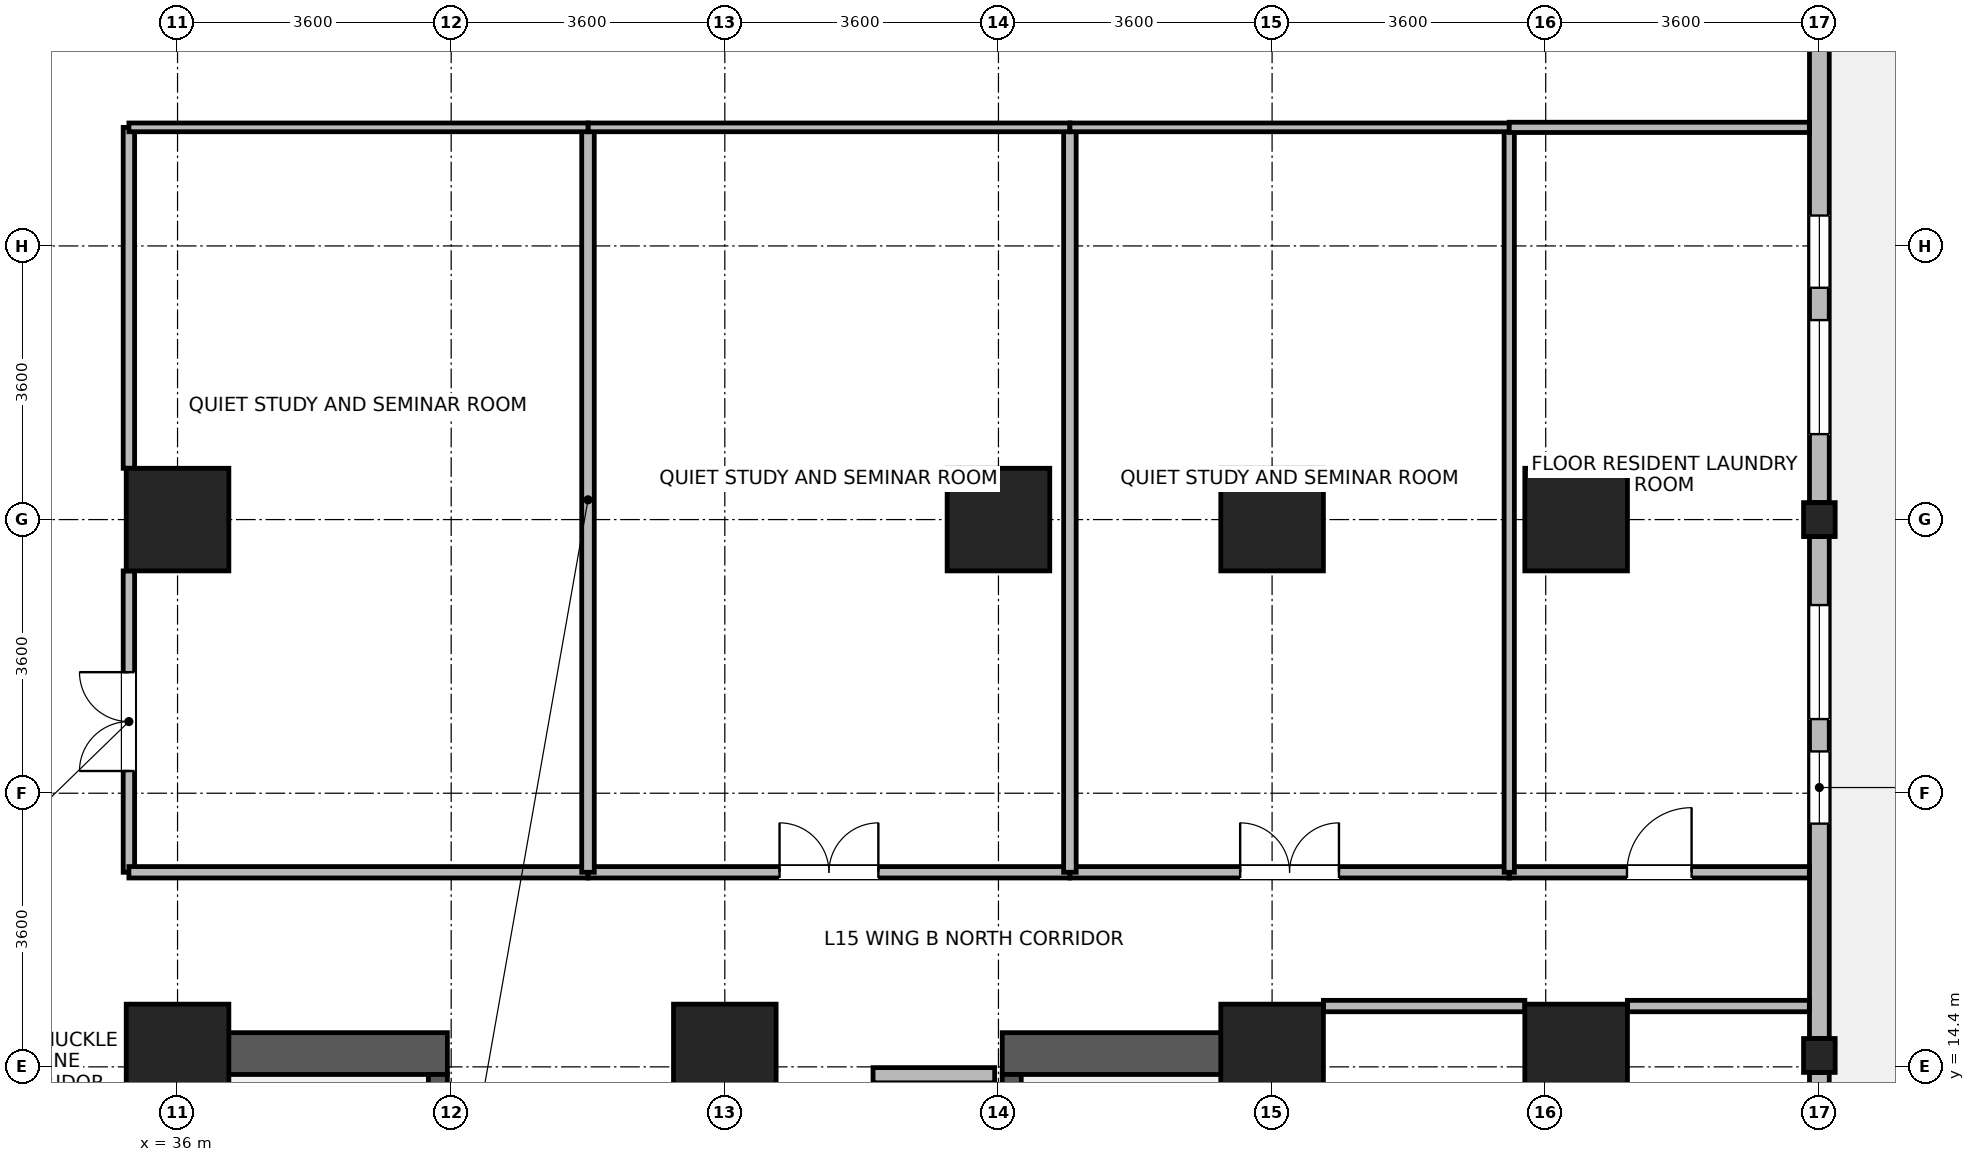
"""IFC4 building model, lengths in metres.
Left out: names, types, materials, properties, quantities, classifications, styles, units other than length and angle.
Written with IfcOpenShell. Run it as: python <this file> out.ifc"""

import sys

from ifc_helpers import new_model, si_unit, direction, frame, frame_2d, origin, origin_2d, place, context, subcontext, project, spatial, rectangle, i_section, extrude, source, transform, mapped, element, fill, save


model = new_model("IFC4")
c1 = context("Model", 3, precision=1e-05, world=origin(), true_north=direction((0.0, 1.0)))
c2 = subcontext(c1, "Body", "Model", "MODEL_VIEW")
j1 = project(units=[si_unit("LENGTHUNIT", "METRE"), si_unit("PLANEANGLEUNIT", "RADIAN")], contexts=[c1])
p1 = place(None, origin())
s1 = spatial("IfcSite", under=j1, at=p1, CompositionType="ELEMENT")
p2 = place(p1, origin())
s2 = spatial("IfcBuilding", under=s1, at=p2, CompositionType="ELEMENT")
p3 = place(p2, frame((0.0, 0.0, 62.3)))
s3 = spatial("IfcBuildingStorey", under=s2, at=p3, CompositionType="ELEMENT", Elevation=62.3)
for number, where, z_axis, x_axis in (
    (1, (36.075, 6.75, 0.0), (0.0, 0.0, 1.0), (0.0, 1.0, 0.0)),
    (2, (50.325, 6.75, 0.0), (0.0, 0.0, 1.0), (0.0, 1.0, 0.0)),
):
    element("IfcWall", number, at=place(p3, frame(where, z_axis=z_axis, x_axis=x_axis)), inside=s3, PredefinedType="SHEAR", context=c2, shape_type="SweptSolid", body=[
        extrude(rectangle(XDim=8.1, YDim=0.55, at=frame_2d((4.05, 0.0))), origin(), (0.0, 0.0, 1.0), 3.45),
    ])
for number, where, z_axis, x_axis in (
    (3, (36.35, 14.575, 0.0), (0.0, 0.0, 1.0), (1.0, 0.0, 0.0)),
    (4, (46.85, 14.575, 0.0), (0.0, 0.0, 1.0), (1.0, 0.0, 0.0)),
):
    element("IfcWall", number, at=place(p3, frame(where, z_axis=z_axis, x_axis=x_axis)), inside=s3, PredefinedType="SHEAR", context=c2, shape_type="SweptSolid", body=[
        extrude(rectangle(XDim=3.2, YDim=0.55, at=frame_2d((1.6, 0.0))), origin(), (0.0, 0.0, 1.0), 3.45),
    ])
p4 = place(p3, frame((39.425, 7.3, 0.0), z_axis=(0.0, 0.0, 1.0), x_axis=(0.0, 1.0, 0.0)))
e5 = element("IfcWall", 5, at=p4, inside=s3, PredefinedType="SHEAR", context=c2, shape_type="SweptSolid", body=[
    extrude(rectangle(XDim=7.0, YDim=0.25, at=frame_2d((3.5, 0.0))), origin(), (0.0, 0.0, 1.0), 3.45),
])
p5 = place(p4, frame((0.15, 0.0, 0.0)))
e6 = element("IfcOpeningElement", 6, at=p5, cuts=e5, PredefinedType="OPENING", context=c2, shape_type="SweptSolid", body=[
    extrude(rectangle(XDim=1.1, YDim=2.08, at=frame_2d((0.55, 1.04))), frame((0.0, 0.135, 0.0), z_axis=(0.0, -1.0, 0.0), x_axis=(1.0, 0.0, 0.0)), (0.0, 0.0, 1.0), 0.27),
])
p6 = place(p3, frame((46.975, 7.3, 0.0), z_axis=(0.0, 0.0, 1.0), x_axis=(0.0, 1.0, 0.0)))
e7 = element("IfcWall", 7, at=p6, inside=s3, PredefinedType="SHEAR", context=c2, shape_type="SweptSolid", body=[
    extrude(rectangle(XDim=7.0, YDim=0.25, at=frame_2d((3.5, 0.0))), origin(), (0.0, 0.0, 1.0), 3.45),
])
p7 = place(p6, frame((0.15, 0.0, 0.0)))
e8 = element("IfcOpeningElement", 8, at=p7, cuts=e7, PredefinedType="OPENING", context=c2, shape_type="SweptSolid", body=[
    extrude(rectangle(XDim=1.1, YDim=2.08, at=frame_2d((0.55, 1.04))), frame((0.0, 0.135, 0.0), z_axis=(0.0, -1.0, 0.0), x_axis=(1.0, 0.0, 0.0)), (0.0, 0.0, 1.0), 0.27),
])
m1 = source(origin(), c2, "Body", "SweptSolid", [
    extrude(rectangle(XDim=1.35, YDim=1.35, at=origin_2d()), origin(), (0.0, 0.0, 1.0), 3.7),
])
for number, where, z_axis, x_axis in (
    (9, (36.0, 21.6, 0.0), (0.0, 0.0, 1.0), (1.0, 0.0, 0.0)),
    (10, (46.8, 21.6, 0.0), (0.0, 0.0, 1.0), (1.0, 0.0, 0.0)),
    (11, (36.0, 14.55, 0.0), (0.0, 0.0, 1.0), (1.0, 0.0, 0.0)),
    (12, (43.2, 14.55, 0.0), (0.0, 0.0, 1.0), (1.0, 0.0, 0.0)),
    (13, (50.4, 14.55, 0.0), (0.0, 0.0, 1.0), (1.0, 0.0, 0.0)),
    (14, (50.4, 21.6, 0.0), (0.0, 0.0, 1.0), (1.0, 0.0, 0.0)),
    (15, (54.4, 14.55, 0.0), (0.0, 0.0, 1.0), (1.0, 0.0, 0.0)),
    (16, (54.4, 21.6, 0.0), (0.0, 0.0, 1.0), (1.0, 0.0, 0.0)),
):
    element("IfcColumn", number, at=place(p3, frame(where, z_axis=z_axis, x_axis=x_axis)), inside=s3, PredefinedType="COLUMN", context=c2, shape_type="MappedRepresentation", body=[
        mapped(m1, transform((0.0, 0.0, 0.0), x_axis=(1.0, 0.0, 0.0), y_axis=(0.0, 1.0, 0.0), z_axis=(0.0, 0.0, 1.0), scale=1.0)),
    ])
m2 = source(origin(), c2, "Body", "SweptSolid", [
    extrude(i_section(OverallWidth=0.416, OverallDepth=0.446, WebThickness=0.029, FlangeThickness=0.04, FilletRadius=0.015, at=origin_2d()), origin(), (0.0, 0.0, 1.0), 3.7),
])
for number, where, z_axis, x_axis in (
    (17, (57.6, 14.55, 0.0), (0.0, 0.0, 1.0), (1.0, 0.0, 0.0)),
    (18, (57.6, 21.6, 0.0), (0.0, 0.0, 1.0), (1.0, 0.0, 0.0)),
):
    element("IfcColumn", number, at=place(p3, frame(where, z_axis=z_axis, x_axis=x_axis)), inside=s3, PredefinedType="COLUMN", context=c2, shape_type="MappedRepresentation", body=[
        mapped(m2, transform((0.0, 0.0, 0.0), x_axis=(1.0, 0.0, 0.0), y_axis=(0.0, 1.0, 0.0), z_axis=(0.0, 0.0, 1.0), scale=1.0)),
    ])
p8 = place(p3, frame((57.6, 14.326, 0.0), z_axis=(0.0, 0.0, 1.0), x_axis=(0.0, -1.0, 0.0)))
e19 = element("IfcWall", 19, at=p8, inside=s3, PredefinedType="STANDARD", context=c2, shape_type="SweptSolid", body=[
    extrude(rectangle(XDim=7.052, YDim=0.26, at=frame_2d((3.526, 0.0))), origin(), (0.0, 0.0, 1.0), 2.93),
])
p9 = place(p8, frame((2.776, 0.0, 0.0)))
e20 = element("IfcOpeningElement", 20, at=p9, cuts=e19, PredefinedType="OPENING", context=c2, shape_type="SweptSolid", body=[
    extrude(rectangle(XDim=1.5, YDim=2.15, at=frame_2d((0.75, 1.075))), frame((0.0, 0.14, 0.0), z_axis=(0.0, -1.0, 0.0), x_axis=(1.0, 0.0, 0.0)), (0.0, 0.0, 1.0), 0.28),
])
p10 = place(p8, frame((1.013, 0.0, 0.85)))
e21 = element("IfcOpeningElement", 21, at=p10, cuts=e19, PredefinedType="OPENING", context=c2, shape_type="SweptSolid", body=[
    extrude(rectangle(XDim=1.5, YDim=1.85, at=frame_2d((0.75, 0.925))), frame((0.0, 0.14, 0.0), z_axis=(0.0, -1.0, 0.0), x_axis=(1.0, 0.0, 0.0)), (0.0, 0.0, 1.0), 0.28),
])
p11 = place(p8, frame((4.539, 0.0, 0.85)))
e22 = element("IfcOpeningElement", 22, at=p11, cuts=e19, PredefinedType="OPENING", context=c2, shape_type="SweptSolid", body=[
    extrude(rectangle(XDim=1.5, YDim=1.85, at=frame_2d((0.75, 0.925))), frame((0.0, 0.14, 0.0), z_axis=(0.0, -1.0, 0.0), x_axis=(1.0, 0.0, 0.0)), (0.0, 0.0, 1.0), 0.28),
])
p12 = place(p3, frame((57.6, 21.376, 0.0), z_axis=(0.0, 0.0, 1.0), x_axis=(0.0, -1.0, 0.0)))
e23 = element("IfcWall", 23, at=p12, inside=s3, PredefinedType="STANDARD", context=c2, shape_type="SweptSolid", body=[
    extrude(rectangle(XDim=6.602, YDim=0.26, at=frame_2d((3.301, 0.0))), origin(), (0.0, 0.0, 1.0), 2.93),
])
p13 = place(p12, frame((0.9, 0.0, 0.85)))
e24 = element("IfcOpeningElement", 24, at=p13, cuts=e23, PredefinedType="OPENING", context=c2, shape_type="SweptSolid", body=[
    extrude(rectangle(XDim=1.5, YDim=1.85, at=frame_2d((0.75, 0.925))), frame((0.0, 0.14, 0.0), z_axis=(0.0, -1.0, 0.0), x_axis=(1.0, 0.0, 0.0)), (0.0, 0.0, 1.0), 0.28),
])
p14 = place(p12, frame((2.826, 0.0, 0.85)))
e25 = element("IfcOpeningElement", 25, at=p14, cuts=e23, PredefinedType="OPENING", context=c2, shape_type="SweptSolid", body=[
    extrude(rectangle(XDim=0.95, YDim=1.75, at=frame_2d((0.475, 0.875))), frame((0.0, 0.14, 0.0), z_axis=(0.0, -1.0, 0.0), x_axis=(1.0, 0.0, 0.0)), (0.0, 0.0, 1.0), 0.28),
])
p15 = place(p3, frame((57.6, 28.426, 0.0), z_axis=(0.0, 0.0, 1.0), x_axis=(0.0, -1.0, 0.0)))
e26 = element("IfcWall", 26, at=p15, inside=s3, PredefinedType="STANDARD", context=c2, shape_type="SweptSolid", body=[
    extrude(rectangle(XDim=6.602, YDim=0.26, at=frame_2d((3.301, 0.0))), origin(), (0.0, 0.0, 1.0), 2.93),
])
p16 = place(p15, frame((4.201, 0.0, 0.85)))
e27 = element("IfcOpeningElement", 27, at=p16, cuts=e26, PredefinedType="OPENING", context=c2, shape_type="SweptSolid", body=[
    extrude(rectangle(XDim=1.5, YDim=1.85, at=frame_2d((0.75, 0.925))), frame((0.0, 0.14, 0.0), z_axis=(0.0, -1.0, 0.0), x_axis=(1.0, 0.0, 0.0)), (0.0, 0.0, 1.0), 0.28),
])
p17 = place(p15, frame((2.826, 0.0, 0.85)))
e28 = element("IfcOpeningElement", 28, at=p17, cuts=e26, PredefinedType="OPENING", context=c2, shape_type="SweptSolid", body=[
    extrude(rectangle(XDim=0.95, YDim=1.75, at=frame_2d((0.475, 0.875))), frame((0.0, 0.14, 0.0), z_axis=(0.0, -1.0, 0.0), x_axis=(1.0, 0.0, 0.0)), (0.0, 0.0, 1.0), 0.28),
])
p18 = place(p3, frame((45.15, 14.29, 0.0), z_axis=(0.0, 0.0, 1.0), x_axis=(1.0, 0.0, 0.0)))
e29 = element("IfcWall", 29, at=p18, inside=s3, PredefinedType="PARTITIONING", context=c2, shape_type="SweptSolid", body=[
    extrude(rectangle(XDim=1.6, YDim=0.2, at=frame_2d((0.8, 0.0))), origin(), (0.0, 0.0, 1.0), 2.23),
])
p19 = place(p3, frame((35.36, 16.96, 0.0), z_axis=(0.0, 0.0, 1.0), x_axis=(0.0, 1.0, 0.0)))
e30 = element("IfcWall", 30, at=p19, inside=s3, PredefinedType="PARTITIONING", context=c2, shape_type="SweptSolid", body=[
    extrude(rectangle(XDim=3.965, YDim=0.15, at=frame_2d((1.982, 0.0))), origin(), (0.0, 0.0, 1.0), 3.43),
])
p20 = place(p19, frame((1.333, 0.0, 0.0)))
e31 = element("IfcOpeningElement", 31, at=p20, cuts=e30, PredefinedType="OPENING", context=c2, shape_type="SweptSolid", body=[
    extrude(rectangle(XDim=1.3, YDim=2.12, at=frame_2d((0.65, 1.06))), frame((0.0, 0.085, 0.0), z_axis=(0.0, -1.0, 0.0), x_axis=(1.0, 0.0, 0.0)), (0.0, 0.0, 1.0), 0.17),
])
p21 = place(p3, frame((35.36, 22.275, 0.0), z_axis=(0.0, 0.0, 1.0), x_axis=(0.0, 1.0, 0.0)))
e32 = element("IfcWall", 32, at=p21, inside=s3, PredefinedType="PARTITIONING", context=c2, shape_type="SweptSolid", body=[
    extrude(rectangle(XDim=4.485, YDim=0.15, at=frame_2d((2.243, 0.0))), origin(), (0.0, 0.0, 1.0), 3.43),
])
p22 = place(p3, frame((51.075, 15.2, 0.0), z_axis=(0.0, 0.0, 1.0), x_axis=(1.0, 0.0, 0.0)))
e33 = element("IfcWall", 33, at=p22, inside=s3, PredefinedType="PARTITIONING", context=c2, shape_type="SweptSolid", body=[
    extrude(rectangle(XDim=2.65, YDim=0.15, at=frame_2d((1.325, 0.0))), origin(), (0.0, 0.0, 1.0), 3.43),
])
p23 = place(p3, frame((55.075, 15.2, 0.0), z_axis=(0.0, 0.0, 1.0), x_axis=(1.0, 0.0, 0.0)))
e34 = element("IfcWall", 34, at=p23, inside=s3, PredefinedType="PARTITIONING", context=c2, shape_type="SweptSolid", body=[
    extrude(rectangle(XDim=2.393, YDim=0.15, at=frame_2d((1.197, 0.0))), origin(), (0.0, 0.0, 1.0), 3.43),
])
p24 = place(p3, frame((41.4, 16.96, 0.0), z_axis=(0.0, 0.0, 1.0), x_axis=(1.0, 0.0, 0.0)))
e35 = element("IfcWall", 35, at=p24, inside=s3, PredefinedType="PARTITIONING", context=c2, shape_type="SweptSolid", body=[
    extrude(rectangle(XDim=6.34, YDim=0.15, at=frame_2d((3.17, 0.0))), origin(), (0.0, 0.0, 1.0), 3.43),
])
p25 = place(p24, frame((2.52, 0.0, 0.0)))
e36 = element("IfcOpeningElement", 36, at=p25, cuts=e35, PredefinedType="OPENING", context=c2, shape_type="SweptSolid", body=[
    extrude(rectangle(XDim=1.3, YDim=2.12, at=frame_2d((0.65, 1.06))), frame((0.0, 0.085, 0.0), z_axis=(0.0, -1.0, 0.0), x_axis=(1.0, 0.0, 0.0)), (0.0, 0.0, 1.0), 0.17),
])
p26 = place(p3, frame((35.36, 16.96, 0.0), z_axis=(0.0, 0.0, 1.0), x_axis=(1.0, 0.0, 0.0)))
e37 = element("IfcWall", 37, at=p26, inside=s3, PredefinedType="PARTITIONING", context=c2, shape_type="SweptSolid", body=[
    extrude(rectangle(XDim=6.04, YDim=0.15, at=frame_2d((3.02, 0.0))), origin(), (0.0, 0.0, 1.0), 3.43),
])
p27 = place(p3, frame((47.74, 16.96, 0.0), z_axis=(0.0, 0.0, 1.0), x_axis=(1.0, 0.0, 0.0)))
e38 = element("IfcWall", 38, at=p27, inside=s3, PredefinedType="PARTITIONING", context=c2, shape_type="SweptSolid", body=[
    extrude(rectangle(XDim=5.78, YDim=0.15, at=frame_2d((2.89, 0.0))), origin(), (0.0, 0.0, 1.0), 3.43),
])
p28 = place(p27, frame((2.24, 0.0, 0.0)))
e39 = element("IfcOpeningElement", 39, at=p28, cuts=e38, PredefinedType="OPENING", context=c2, shape_type="SweptSolid", body=[
    extrude(rectangle(XDim=1.3, YDim=2.12, at=frame_2d((0.65, 1.06))), frame((0.0, 0.085, 0.0), z_axis=(0.0, -1.0, 0.0), x_axis=(1.0, 0.0, 0.0)), (0.0, 0.0, 1.0), 0.17),
])
p29 = place(p3, frame((53.52, 16.96, 0.0), z_axis=(0.0, 0.0, 1.0), x_axis=(1.0, 0.0, 0.0)))
e40 = element("IfcWall", 40, at=p29, inside=s3, PredefinedType="PARTITIONING", context=c2, shape_type="SweptSolid", body=[
    extrude(rectangle(XDim=3.948, YDim=0.15, at=frame_2d((1.974, 0.0))), origin(), (0.0, 0.0, 1.0), 3.43),
])
p30 = place(p29, frame((1.549, 0.0, 0.0)))
e41 = element("IfcOpeningElement", 41, at=p30, cuts=e40, PredefinedType="OPENING", context=c2, shape_type="SweptSolid", body=[
    extrude(rectangle(XDim=0.85, YDim=2.04, at=frame_2d((0.425, 1.02))), frame((0.0, 0.085, 0.0), z_axis=(0.0, -1.0, 0.0), x_axis=(1.0, 0.0, 0.0)), (0.0, 0.0, 1.0), 0.17),
])
for number, where, z_axis, x_axis in (
    (42, (41.4, 16.96, 0.0), (0.0, 0.0, 1.0), (0.0, 1.0, 0.0)),
    (43, (47.74, 16.96, 0.0), (0.0, 0.0, 1.0), (0.0, 1.0, 0.0)),
):
    element("IfcWall", number, at=place(p3, frame(where, z_axis=z_axis, x_axis=x_axis)), inside=s3, PredefinedType="PARTITIONING", context=c2, shape_type="SweptSolid", body=[
        extrude(rectangle(XDim=9.8, YDim=0.165, at=frame_2d((4.9, 0.0))), origin(), (0.0, 0.0, 1.0), 3.43),
    ])
p31 = place(p3, frame((53.52, 16.96, 0.0), z_axis=(0.0, 0.0, 1.0), x_axis=(0.0, 1.0, 0.0)))
e44 = element("IfcWall", 44, at=p31, inside=s3, PredefinedType="PARTITIONING", context=c2, shape_type="SweptSolid", body=[
    extrude(rectangle(XDim=9.8, YDim=0.135, at=frame_2d((4.9, 0.0))), origin(), (0.0, 0.0, 1.0), 3.43),
])
p32 = place(p3, frame((41.4, 26.76, 0.0), z_axis=(0.0, 0.0, 1.0), x_axis=(1.0, 0.0, 0.0)))
e45 = element("IfcWall", 45, at=p32, inside=s3, PredefinedType="PARTITIONING", context=c2, shape_type="SweptSolid", body=[
    extrude(rectangle(XDim=6.34, YDim=0.115, at=frame_2d((3.17, 0.0))), origin(), (0.0, 0.0, 1.0), 3.43),
])
p33 = place(p3, frame((35.36, 26.76, 0.0), z_axis=(0.0, 0.0, 1.0), x_axis=(1.0, 0.0, 0.0)))
e46 = element("IfcWall", 46, at=p33, inside=s3, PredefinedType="PARTITIONING", context=c2, shape_type="SweptSolid", body=[
    extrude(rectangle(XDim=6.04, YDim=0.115, at=frame_2d((3.02, 0.0))), origin(), (0.0, 0.0, 1.0), 3.43),
])
p34 = place(p3, frame((47.74, 26.76, 0.0), z_axis=(0.0, 0.0, 1.0), x_axis=(1.0, 0.0, 0.0)))
e47 = element("IfcWall", 47, at=p34, inside=s3, PredefinedType="PARTITIONING", context=c2, shape_type="SweptSolid", body=[
    extrude(rectangle(XDim=5.78, YDim=0.115, at=frame_2d((2.89, 0.0))), origin(), (0.0, 0.0, 1.0), 3.43),
])
p35 = place(p3, frame((53.52, 26.76, 0.0), z_axis=(0.0, 0.0, 1.0), x_axis=(1.0, 0.0, 0.0)))
e48 = element("IfcWall", 48, at=p35, inside=s3, PredefinedType="PARTITIONING", context=c2, shape_type="SweptSolid", body=[
    extrude(rectangle(XDim=3.948, YDim=0.135, at=frame_2d((1.974, 0.0))), origin(), (0.0, 0.0, 1.0), 3.43),
])
p36 = place(p13, origin())
e49 = element("IfcWindow", 49, at=p36, inside=s3, PartitioningType="SINGLE_PANEL", PredefinedType="WINDOW", context=c2, shape_type="SweptSolid", body=[
    extrude(rectangle(XDim=1.5, YDim=1.85, at=frame_2d((0.75, 0.925))), frame((0.0, 0.03, 0.0), z_axis=(0.0, -1.0, 0.0), x_axis=(1.0, 0.0, 0.0)), (0.0, 0.0, 1.0), 0.06),
])
fill(e24, e49)
p37 = place(p14, origin())
e50 = element("IfcWindow", 50, at=p37, inside=s3, PartitioningType="SINGLE_PANEL", PredefinedType="WINDOW", context=c2, shape_type="SweptSolid", body=[
    extrude(rectangle(XDim=0.95, YDim=1.75, at=frame_2d((0.475, 0.875))), frame((0.0, 0.03, 0.0), z_axis=(0.0, -1.0, 0.0), x_axis=(1.0, 0.0, 0.0)), (0.0, 0.0, 1.0), 0.06),
])
fill(e25, e50)
p38 = place(p16, origin())
e51 = element("IfcWindow", 51, at=p38, inside=s3, PartitioningType="SINGLE_PANEL", PredefinedType="WINDOW", context=c2, shape_type="SweptSolid", body=[
    extrude(rectangle(XDim=1.5, YDim=1.85, at=frame_2d((0.75, 0.925))), frame((0.0, 0.03, 0.0), z_axis=(0.0, -1.0, 0.0), x_axis=(1.0, 0.0, 0.0)), (0.0, 0.0, 1.0), 0.06),
])
fill(e27, e51)
p39 = place(p17, origin())
e52 = element("IfcWindow", 52, at=p39, inside=s3, PartitioningType="SINGLE_PANEL", PredefinedType="WINDOW", context=c2, shape_type="SweptSolid", body=[
    extrude(rectangle(XDim=0.95, YDim=1.75, at=frame_2d((0.475, 0.875))), frame((0.0, 0.03, 0.0), z_axis=(0.0, -1.0, 0.0), x_axis=(1.0, 0.0, 0.0)), (0.0, 0.0, 1.0), 0.06),
])
fill(e28, e52)
p40 = place(p20, origin())
e53 = element("IfcDoor", 53, at=p40, inside=s3, OperationType="DOUBLE_DOOR_SINGLE_SWING", PredefinedType="DOOR", context=c2, shape_type="SweptSolid", body=[
    extrude(rectangle(XDim=1.3, YDim=2.12, at=frame_2d((0.65, 1.06))), frame((0.0, 0.025, 0.0), z_axis=(0.0, -1.0, 0.0), x_axis=(1.0, 0.0, 0.0)), (0.0, 0.0, 1.0), 0.05),
])
fill(e31, e53)
p41 = place(p25, origin())
e54 = element("IfcDoor", 54, at=p41, inside=s3, OperationType="DOUBLE_DOOR_SINGLE_SWING", PredefinedType="DOOR", context=c2, shape_type="SweptSolid", body=[
    extrude(rectangle(XDim=1.3, YDim=2.12, at=frame_2d((0.65, 1.06))), frame((0.0, 0.025, 0.0), z_axis=(0.0, -1.0, 0.0), x_axis=(1.0, 0.0, 0.0)), (0.0, 0.0, 1.0), 0.05),
])
fill(e36, e54)
p42 = place(p28, origin())
e55 = element("IfcDoor", 55, at=p42, inside=s3, OperationType="DOUBLE_DOOR_SINGLE_SWING", PredefinedType="DOOR", context=c2, shape_type="SweptSolid", body=[
    extrude(rectangle(XDim=1.3, YDim=2.12, at=frame_2d((0.65, 1.06))), frame((0.0, 0.025, 0.0), z_axis=(0.0, -1.0, 0.0), x_axis=(1.0, 0.0, 0.0)), (0.0, 0.0, 1.0), 0.05),
])
fill(e39, e55)
p43 = place(p30, origin())
e56 = element("IfcDoor", 56, at=p43, inside=s3, OperationType="SINGLE_SWING_RIGHT", PredefinedType="DOOR", context=c2, shape_type="SweptSolid", body=[
    extrude(rectangle(XDim=0.85, YDim=2.04, at=frame_2d((0.425, 1.02))), frame((0.0, 0.025, 0.0), z_axis=(0.0, -1.0, 0.0), x_axis=(1.0, 0.0, 0.0)), (0.0, 0.0, 1.0), 0.05),
])
fill(e41, e56)
save(model, sys.argv[1])
